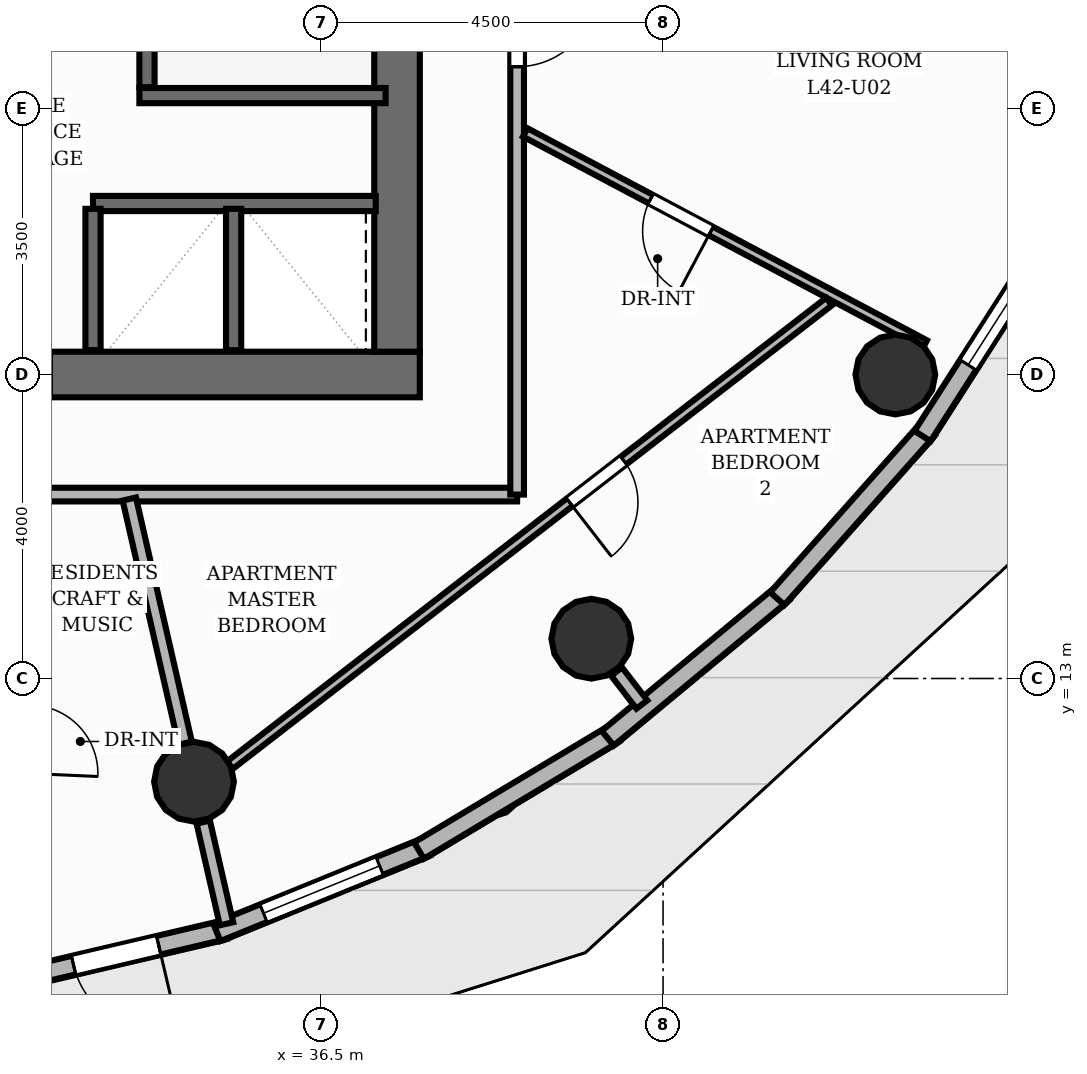
"""IFC4 building model, lengths in metres.
Left out: names, types, materials, properties, quantities, classifications, styles, units other than length and angle.
Written with IfcOpenShell. Run it as: python <this file> out.ifc"""

import sys

from ifc_helpers import new_model, si_unit, direction, frame, frame_2d, origin, origin_2d, place, context, subcontext, project, spatial, rectangle, circle, extrude, element, fill, save


model = new_model("IFC4")
c1 = context("Model", 3, precision=1e-05, world=origin(), true_north=direction((0.0, 1.0)))
c2 = subcontext(c1, "Body", "Model", "MODEL_VIEW")
j1 = project(units=[si_unit("LENGTHUNIT", "METRE"), si_unit("PLANEANGLEUNIT", "RADIAN")], contexts=[c1])
p1 = place(None, origin())
s1 = spatial("IfcSite", under=j1, at=p1, CompositionType="ELEMENT")
p2 = place(p1, origin())
s2 = spatial("IfcBuilding", under=s1, at=p2, CompositionType="ELEMENT")
p3 = place(p2, frame((0.0, 0.0, 142.56)))
s3 = spatial("IfcBuildingStorey", under=s2, at=p3, CompositionType="ELEMENT", Elevation=142.56)
p4 = place(p3, frame((22.7, 17.0, 0.0), z_axis=(0.0, 0.0, 1.0), x_axis=(1.0, 0.0, 0.0)))
e1 = element("IfcWall", 1, at=p4, inside=s3, PredefinedType="SHEAR", context=c2, shape_type="SweptSolid", body=[
    extrude(rectangle(XDim=15.1, YDim=0.6, at=frame_2d((7.55, 0.0))), origin(), (0.0, 0.0, 1.0), 3.2),
])
p5 = place(p4, frame((5.8, 0.0, 0.0)))
e2 = element("IfcOpeningElement", 2, at=p5, cuts=e1, PredefinedType="OPENING", context=c2, shape_type="SweptSolid", body=[
    extrude(rectangle(XDim=1.1, YDim=2.15, at=frame_2d((0.55, 1.075))), frame((0.0, 0.31, 0.0), z_axis=(0.0, -1.0, 0.0), x_axis=(1.0, 0.0, 0.0)), (0.0, 0.0, 1.0), 0.62),
])
p6 = place(p4, frame((9.35, 0.0, 0.0)))
e3 = element("IfcOpeningElement", 3, at=p6, cuts=e1, PredefinedType="OPENING", context=c2, shape_type="SweptSolid", body=[
    extrude(rectangle(XDim=0.9, YDim=2.1, at=frame_2d((0.45, 1.05))), frame((0.0, 0.31, 0.0), z_axis=(0.0, -1.0, 0.0), x_axis=(1.0, 0.0, 0.0)), (0.0, 0.0, 1.0), 0.62),
])
p7 = place(p3, frame((37.5, 17.3, 0.0), z_axis=(0.0, 0.0, 1.0), x_axis=(0.0, 1.0, 0.0)))
e4 = element("IfcWall", 4, at=p7, inside=s3, PredefinedType="SHEAR", context=c2, shape_type="SweptSolid", body=[
    extrude(rectangle(XDim=13.4, YDim=0.6, at=frame_2d((6.7, 0.0))), origin(), (0.0, 0.0, 1.0), 3.2),
])
for number, where, z_axis, x_axis in (
    (5, (34.829, 11.642, 0.0), (0.0, 0.0, 1.0), (1.0, 0.0, 0.0)),
    (6, (40.056, 13.523, 0.0), (0.0, 0.0, 1.0), (1.0, 0.0, 0.0)),
    (7, (44.056, 17.0, 0.0), (0.0, 0.0, 1.0), (1.0, 0.0, 0.0)),
):
    element("IfcColumn", number, at=place(p3, frame(where, z_axis=z_axis, x_axis=x_axis)), inside=s3, PredefinedType="COLUMN", context=c2, shape_type="SweptSolid", body=[
        extrude(circle(Radius=0.525, at=origin_2d()), origin(), (0.0, 0.0, 1.0), 3.2),
    ])
p8 = place(p3, frame((35.233, 9.695, 0.0), z_axis=(0.0, 0.0, 1.0), x_axis=(-0.973538048261, -0.228524984602, 0.0)))
e8 = element("IfcWall", 8, at=p8, inside=s3, PredefinedType="SOLIDWALL", context=c2, shape_type="SweptSolid", body=[
    extrude(rectangle(XDim=2.937, YDim=0.25, at=frame_2d((1.468, 0.0))), origin(), (0.0, 0.0, 1.0), 2.96),
])
p9 = place(p8, frame((0.893, 0.0, 0.0)))
e9 = element("IfcOpeningElement", 9, at=p9, cuts=e8, PredefinedType="OPENING", context=c2, shape_type="SweptSolid", body=[
    extrude(rectangle(XDim=1.15, YDim=2.2, at=frame_2d((0.575, 1.1))), frame((0.0, 0.135, 0.0), z_axis=(0.0, -1.0, 0.0), x_axis=(1.0, 0.0, 0.0)), (0.0, 0.0, 1.0), 0.27),
])
p10 = place(p3, frame((37.886, 10.785, 0.0), z_axis=(0.0, 0.0, 1.0), x_axis=(-0.926076439021, -0.377335963154, 0.0)))
e10 = element("IfcWall", 10, at=p10, inside=s3, PredefinedType="SOLIDWALL", context=c2, shape_type="SweptSolid", body=[
    extrude(rectangle(XDim=2.977, YDim=0.25, at=frame_2d((1.488, 0.0))), origin(), (0.0, 0.0, 1.0), 2.96),
])
p11 = place(p10, frame((0.664, 0.0, 0.85)))
e11 = element("IfcOpeningElement", 11, at=p11, cuts=e10, PredefinedType="OPENING", context=c2, shape_type="SweptSolid", body=[
    extrude(rectangle(XDim=1.65, YDim=1.55, at=frame_2d((0.825, 0.775))), frame((0.0, 0.135, 0.0), z_axis=(0.0, -1.0, 0.0), x_axis=(1.0, 0.0, 0.0)), (0.0, 0.0, 1.0), 0.27),
])
for number, where, z_axis, x_axis in (
    (12, (40.361, 12.277, 0.0), (0.0, 0.0, 1.0), (-0.858, -0.514, 0.0)),
    (13, (42.581, 14.127, 0.0), (0.0, 0.0, 1.0), (-0.77, -0.638, 0.0)),
):
    element("IfcWall", number, at=place(p3, frame(where, z_axis=z_axis, x_axis=x_axis)), inside=s3, PredefinedType="SOLIDWALL", context=c2, shape_type="SweptSolid", body=[
        extrude(rectangle(XDim=2.998, YDim=0.25, at=frame_2d((1.499, 0.0))), origin(), (0.0, 0.0, 1.0), 2.96),
    ])
p12 = place(p3, frame((44.48, 16.277, 0.0), z_axis=(0.0, 0.0, 1.0), x_axis=(-0.664002369324, -0.747730468506, 0.0)))
e14 = element("IfcWall", 14, at=p12, inside=s3, PredefinedType="SOLIDWALL", context=c2, shape_type="SweptSolid", body=[
    extrude(rectangle(XDim=2.977, YDim=0.25, at=frame_2d((1.489, 0.0))), origin(), (0.0, 0.0, 1.0), 2.96),
])
p13 = place(p3, frame((45.998, 18.663, 0.0), z_axis=(0.0, 0.0, 1.0), x_axis=(-0.539492373821, -0.841990486044, 0.0)))
e15 = element("IfcWall", 15, at=p13, inside=s3, PredefinedType="SOLIDWALL", context=c2, shape_type="SweptSolid", body=[
    extrude(rectangle(XDim=2.937, YDim=0.25, at=frame_2d((1.469, 0.0))), origin(), (0.0, 0.0, 1.0), 2.96),
])
p14 = place(p13, frame((0.175, 0.0, 0.85)))
e16 = element("IfcOpeningElement", 16, at=p14, cuts=e15, PredefinedType="OPENING", context=c2, shape_type="SweptSolid", body=[
    extrude(rectangle(XDim=1.65, YDim=1.55, at=frame_2d((0.825, 0.775))), frame((0.0, 0.135, 0.0), z_axis=(0.0, -1.0, 0.0), x_axis=(1.0, 0.0, 0.0)), (0.0, 0.0, 1.0), 0.27),
])
p15 = place(p3, frame((34.21, 20.78, 0.0), z_axis=(0.0, 0.0, 1.0), x_axis=(0.0, 1.0, 0.0)))
e17 = element("IfcWall", 17, at=p15, inside=s3, PredefinedType="SHEAR", context=c2, shape_type="SweptSolid", body=[
    extrude(rectangle(XDim=6.44, YDim=0.2, at=frame_2d((3.22, 0.0))), origin(), (0.0, 0.0, 1.0), 3.2),
])
p16 = place(p3, frame((34.11, 20.67, 0.0), z_axis=(0.0, 0.0, 1.0), x_axis=(1.0, 0.0, 0.0)))
e18 = element("IfcWall", 18, at=p16, inside=s3, PredefinedType="SHEAR", context=c2, shape_type="SweptSolid", body=[
    extrude(rectangle(XDim=3.24, YDim=0.2, at=frame_2d((1.62, 0.0))), origin(), (0.0, 0.0, 1.0), 3.2),
])
p17 = place(p3, frame((33.5, 19.25, 0.0), z_axis=(0.0, 0.0, 1.0), x_axis=(1.0, 0.0, 0.0)))
e19 = element("IfcWall", 19, at=p17, inside=s3, PredefinedType="SHEAR", context=c2, shape_type="SweptSolid", body=[
    extrude(rectangle(XDim=3.72, YDim=0.2, at=frame_2d((1.86, 0.0))), origin(), (0.0, 0.0, 1.0), 3.2),
])
for number, where, z_axis, x_axis in (
    (20, (33.5, 17.32, 0.0), (0.0, 0.0, 1.0), (0.0, 1.0, 0.0)),
    (21, (35.35, 17.32, 0.0), (0.0, 0.0, 1.0), (0.0, 1.0, 0.0)),
):
    element("IfcWall", number, at=place(p3, frame(where, z_axis=z_axis, x_axis=x_axis)), inside=s3, PredefinedType="SHEAR", context=c2, shape_type="SweptSolid", body=[
        extrude(rectangle(XDim=1.86, YDim=0.2, at=frame_2d((0.93, 0.0))), origin(), (0.0, 0.0, 1.0), 3.2),
    ])
p18 = place(p3, frame((34.95, 11.111, 0.0), z_axis=(0.0, 0.0, 1.0), x_axis=(0.223027623572, -0.974812125039, 0.0)))
e22 = element("IfcWall", 22, at=p18, inside=s3, PredefinedType="PARTITIONING", context=c2, shape_type="SweptSolid", body=[
    extrude(rectangle(XDim=1.373, YDim=0.18, at=frame_2d((0.687, 0.0))), origin(), (0.0, 0.0, 1.0), 2.336),
])
p19 = place(p3, frame((40.388, 13.092, 0.0), z_axis=(0.0, 0.0, 1.0), x_axis=(0.6096676216, -0.792657171275, 0.0)))
e23 = element("IfcWall", 23, at=p19, inside=s3, PredefinedType="PARTITIONING", context=c2, shape_type="SweptSolid", body=[
    extrude(rectangle(XDim=0.547, YDim=0.18, at=frame_2d((0.273, 0.0))), origin(), (0.0, 0.0, 1.0), 2.336),
])
p20 = place(p3, frame((39.08, 15.42, 0.0), z_axis=(0.0, 0.0, 1.0), x_axis=(-1.0, 0.0, 0.0)))
e24 = element("IfcWall", 24, at=p20, inside=s3, PredefinedType="PARTITIONING", context=c2, shape_type="SweptSolid", body=[
    extrude(rectangle(XDim=17.66, YDim=0.18, at=frame_2d((8.83, 0.0))), origin(), (0.0, 0.0, 1.0), 2.955),
])
p21 = place(p20, frame((7.368, 0.0, 0.0)))
e25 = element("IfcOpeningElement", 25, at=p21, cuts=e24, PredefinedType="OPENING", context=c2, shape_type="SweptSolid", body=[
    extrude(rectangle(XDim=0.9, YDim=2.1, at=frame_2d((0.45, 1.05))), frame((0.0, 0.1, 0.0), z_axis=(0.0, -1.0, 0.0), x_axis=(1.0, 0.0, 0.0)), (0.0, 0.0, 1.0), 0.2),
])
p22 = place(p20, frame((10.224, 0.0, 0.0)))
e26 = element("IfcOpeningElement", 26, at=p22, cuts=e24, PredefinedType="OPENING", context=c2, shape_type="SweptSolid", body=[
    extrude(rectangle(XDim=0.9, YDim=2.1, at=frame_2d((0.45, 1.05))), frame((0.0, 0.1, 0.0), z_axis=(0.0, -1.0, 0.0), x_axis=(1.0, 0.0, 0.0)), (0.0, 0.0, 1.0), 0.2),
])
p23 = place(p20, frame((14.353, 0.0, 0.0)))
e27 = element("IfcOpeningElement", 27, at=p23, cuts=e24, PredefinedType="OPENING", context=c2, shape_type="SweptSolid", body=[
    extrude(rectangle(XDim=0.9, YDim=2.1, at=frame_2d((0.45, 1.05))), frame((0.0, 0.1, 0.0), z_axis=(0.0, -1.0, 0.0), x_axis=(1.0, 0.0, 0.0)), (0.0, 0.0, 1.0), 0.2),
])
p24 = place(p3, frame((39.08, 28.645, 0.0), z_axis=(0.0, 0.0, 1.0), x_axis=(0.0, -1.0, 0.0)))
e28 = element("IfcWall", 28, at=p24, inside=s3, PredefinedType="PARTITIONING", context=c2, shape_type="SweptSolid", body=[
    extrude(rectangle(XDim=13.225, YDim=0.18, at=frame_2d((6.613, 0.0))), origin(), (0.0, 0.0, 1.0), 2.955),
])
p25 = place(p24, frame((6.545, 0.0, 0.0)))
e29 = element("IfcOpeningElement", 29, at=p25, cuts=e28, PredefinedType="OPENING", context=c2, shape_type="SweptSolid", body=[
    extrude(rectangle(XDim=1.05, YDim=2.15, at=frame_2d((0.525, 1.075))), frame((0.0, 0.1, 0.0), z_axis=(0.0, -1.0, 0.0), x_axis=(1.0, 0.0, 0.0)), (0.0, 0.0, 1.0), 0.2),
])
p26 = place(p24, frame((1.812, 0.0, 0.0)))
e30 = element("IfcOpeningElement", 30, at=p26, cuts=e28, PredefinedType="OPENING", context=c2, shape_type="SweptSolid", body=[
    extrude(rectangle(XDim=0.9, YDim=2.1, at=frame_2d((0.45, 1.05))), frame((0.0, 0.1, 0.0), z_axis=(0.0, -1.0, 0.0), x_axis=(1.0, 0.0, 0.0)), (0.0, 0.0, 1.0), 0.2),
])
p27 = place(p3, frame((33.977, 15.362, 0.0), z_axis=(0.0, 0.0, 1.0), x_axis=(0.22319287001, -0.974774303506, 0.0)))
e31 = element("IfcWall", 31, at=p27, inside=s3, PredefinedType="PARTITIONING", context=c2, shape_type="SweptSolid", body=[
    extrude(rectangle(XDim=3.296, YDim=0.18, at=frame_2d((1.648, 0.0))), origin(), (0.0, 0.0, 1.0), 2.336),
])
p28 = place(p3, frame((44.443, 17.395, 0.0), z_axis=(0.0, 0.0, 1.0), x_axis=(-0.883258541518, 0.468886285612, 0.0)))
e32 = element("IfcWall", 32, at=p28, inside=s3, PredefinedType="PARTITIONING", context=c2, shape_type="SweptSolid", body=[
    extrude(rectangle(XDim=5.952, YDim=0.125, at=frame_2d((2.976, 0.0))), origin(), (0.0, 0.0, 1.0), 2.955),
])
p29 = place(p28, frame((3.184, 0.0, 0.0)))
e33 = element("IfcOpeningElement", 33, at=p29, cuts=e32, PredefinedType="OPENING", context=c2, shape_type="SweptSolid", body=[
    extrude(rectangle(XDim=0.9, YDim=2.1, at=frame_2d((0.45, 1.05))), frame((0.0, 0.073, 0.0), z_axis=(0.0, -1.0, 0.0), x_axis=(1.0, 0.0, 0.0)), (0.0, 0.0, 1.0), 0.145),
])
p30 = place(p3, frame((43.184, 17.96, 0.0), z_axis=(0.0, 0.0, 1.0), x_axis=(-0.790862802872, -0.611993486104, 0.0)))
e34 = element("IfcWall", 34, at=p30, inside=s3, PredefinedType="PARTITIONING", context=c2, shape_type="SweptSolid", body=[
    extrude(rectangle(XDim=9.975, YDim=0.125, at=frame_2d((4.987, 0.0))), origin(), (0.0, 0.0, 1.0), 2.411),
])
p31 = place(p30, frame((3.417, 0.0, 0.0)))
e35 = element("IfcOpeningElement", 35, at=p31, cuts=e34, PredefinedType="OPENING", context=c2, shape_type="SweptSolid", body=[
    extrude(rectangle(XDim=0.9, YDim=2.1, at=frame_2d((0.45, 1.05))), frame((0.0, 0.073, 0.0), z_axis=(0.0, -1.0, 0.0), x_axis=(1.0, 0.0, 0.0)), (0.0, 0.0, 1.0), 0.145),
])
p32 = place(p9, origin())
e36 = element("IfcDoor", 36, at=p32, inside=s3, OperationType="SINGLE_SWING_LEFT", PredefinedType="DOOR", context=c2, shape_type="SweptSolid", body=[
    extrude(rectangle(XDim=1.15, YDim=2.2, at=frame_2d((0.575, 1.1))), frame((0.0, 0.025, 0.0), z_axis=(0.0, -1.0, 0.0), x_axis=(1.0, 0.0, 0.0)), (0.0, 0.0, 1.0), 0.05),
])
fill(e9, e36)
p33 = place(p11, origin())
e37 = element("IfcWindow", 37, at=p33, inside=s3, PartitioningType="SINGLE_PANEL", PredefinedType="WINDOW", context=c2, shape_type="SweptSolid", body=[
    extrude(rectangle(XDim=1.65, YDim=1.55, at=frame_2d((0.825, 0.775))), frame((0.0, 0.03, 0.0), z_axis=(0.0, -1.0, 0.0), x_axis=(1.0, 0.0, 0.0)), (0.0, 0.0, 1.0), 0.06),
])
fill(e11, e37)
p34 = place(p14, origin())
e38 = element("IfcWindow", 38, at=p34, inside=s3, PartitioningType="SINGLE_PANEL", PredefinedType="WINDOW", context=c2, shape_type="SweptSolid", body=[
    extrude(rectangle(XDim=1.65, YDim=1.55, at=frame_2d((0.825, 0.775))), frame((0.0, 0.03, 0.0), z_axis=(0.0, -1.0, 0.0), x_axis=(1.0, 0.0, 0.0)), (0.0, 0.0, 1.0), 0.06),
])
fill(e16, e38)
p35 = place(p25, origin())
e39 = element("IfcDoor", 39, at=p35, inside=s3, OperationType="SINGLE_SWING_LEFT", PredefinedType="DOOR", context=c2, shape_type="SweptSolid", body=[
    extrude(rectangle(XDim=1.05, YDim=2.15, at=frame_2d((0.525, 1.075))), frame((0.0, 0.025, 0.0), z_axis=(0.0, -1.0, 0.0), x_axis=(1.0, 0.0, 0.0)), (0.0, 0.0, 1.0), 0.05),
])
fill(e29, e39)
p36 = place(p29, origin())
e40 = element("IfcDoor", 40, at=p36, inside=s3, OperationType="SINGLE_SWING_LEFT", PredefinedType="DOOR", context=c2, shape_type="SweptSolid", body=[
    extrude(rectangle(XDim=0.9, YDim=2.1, at=frame_2d((0.45, 1.05))), frame((0.0, 0.025, 0.0), z_axis=(0.0, -1.0, 0.0), x_axis=(1.0, 0.0, 0.0)), (0.0, 0.0, 1.0), 0.05),
])
fill(e33, e40)
p37 = place(p31, origin())
e41 = element("IfcDoor", 41, at=p37, inside=s3, OperationType="SINGLE_SWING_RIGHT", PredefinedType="DOOR", context=c2, shape_type="SweptSolid", body=[
    extrude(rectangle(XDim=0.9, YDim=2.1, at=frame_2d((0.45, 1.05))), frame((0.0, 0.025, 0.0), z_axis=(0.0, -1.0, 0.0), x_axis=(1.0, 0.0, 0.0)), (0.0, 0.0, 1.0), 0.05),
])
fill(e35, e41)
save(model, sys.argv[1])
